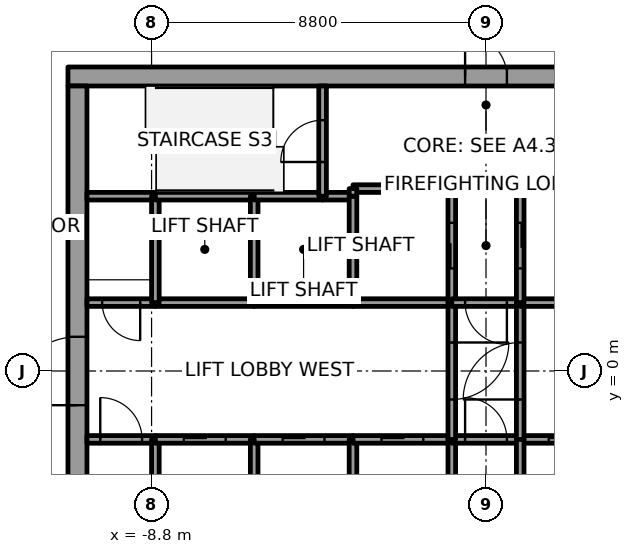
"""IFC4 building model, lengths in metres.
Left out: names, types, materials, properties, quantities, classifications, styles, units other than length and angle.
Written with IfcOpenShell. Run it as: python <this file> out.ifc"""

import sys

from ifc_helpers import new_model, si_unit, direction, frame, frame_2d, origin, place, context, subcontext, project, spatial, rectangle, extrude, element, fill, save


model = new_model("IFC4")
c1 = context("Model", 3, precision=1e-05, world=origin(), true_north=direction((0.0, 1.0)))
c2 = subcontext(c1, "Body", "Model", "MODEL_VIEW")
j1 = project(units=[si_unit("LENGTHUNIT", "METRE"), si_unit("PLANEANGLEUNIT", "RADIAN")], contexts=[c1])
p1 = place(None, origin())
s1 = spatial("IfcSite", under=j1, at=p1, CompositionType="ELEMENT")
p2 = place(p1, origin())
s2 = spatial("IfcBuilding", under=s1, at=p2, CompositionType="ELEMENT")
p3 = place(p2, frame((0.0, 0.0, 157.8)))
s3 = spatial("IfcBuildingStorey", under=s2, at=p3, CompositionType="ELEMENT", Elevation=157.8)
p4 = place(p3, frame((-11.0, 7.75, 0.0), z_axis=(0.0, 0.0, 1.0), x_axis=(1.0, 0.0, 0.0)))
e1 = element("IfcWall", 1, at=p4, inside=s3, PredefinedType="SHEAR", context=c2, shape_type="SweptSolid", body=[
    extrude(rectangle(XDim=22.0, YDim=0.5, at=frame_2d((11.0, 0.0))), origin(), (0.0, 0.0, 1.0), 4.0),
])
p5 = place(p4, frame((10.45, 0.0, 0.0)))
e2 = element("IfcOpeningElement", 2, at=p5, cuts=e1, PredefinedType="OPENING", context=c2, shape_type="SweptSolid", body=[
    extrude(rectangle(XDim=1.1, YDim=2.1, at=frame_2d((0.55, 1.05))), frame((0.0, 0.25, 0.0), z_axis=(0.0, -1.0, 0.0), x_axis=(1.0, 0.0, 0.0)), (0.0, 0.0, 1.0), 0.5),
])
p6 = place(p3, frame((-10.75, -7.5, 0.0), z_axis=(0.0, 0.0, 1.0), x_axis=(0.0, 1.0, 0.0)))
e3 = element("IfcWall", 3, at=p6, inside=s3, PredefinedType="SHEAR", context=c2, shape_type="SweptSolid", body=[
    extrude(rectangle(XDim=15.0, YDim=0.5, at=frame_2d((7.5, 0.0))), origin(), (0.0, 0.0, 1.0), 4.0),
])
p7 = place(p6, frame((6.6, 0.0, 0.0)))
e4 = element("IfcOpeningElement", 4, at=p7, cuts=e3, PredefinedType="OPENING", context=c2, shape_type="SweptSolid", body=[
    extrude(rectangle(XDim=1.8, YDim=2.1, at=frame_2d((0.9, 1.05))), frame((0.0, 0.25, 0.0), z_axis=(0.0, -1.0, 0.0), x_axis=(1.0, 0.0, 0.0)), (0.0, 0.0, 1.0), 0.5),
])
p8 = place(p3, frame((-10.5, -1.8, 0.0), z_axis=(0.0, 0.0, 1.0), x_axis=(1.0, 0.0, 0.0)))
e5 = element("IfcWall", 5, at=p8, inside=s3, PredefinedType="SOLIDWALL", context=c2, shape_type="SweptSolid", body=[
    extrude(rectangle(XDim=1.8, YDim=0.2, at=frame_2d((0.9, 0.0))), origin(), (0.0, 0.0, 1.0), 3.85),
])
p9 = place(p8, frame((0.35, 0.0, 0.0)))
e6 = element("IfcOpeningElement", 6, at=p9, cuts=e5, PredefinedType="OPENING", context=c2, shape_type="SweptSolid", body=[
    extrude(rectangle(XDim=1.1, YDim=2.1, at=frame_2d((0.55, 1.05))), frame((0.0, 0.1, 0.0), z_axis=(0.0, -1.0, 0.0), x_axis=(1.0, 0.0, 0.0)), (0.0, 0.0, 1.0), 0.2),
])
p10 = place(p3, frame((-8.7, 1.8, 0.0), z_axis=(0.0, 0.0, 1.0), x_axis=(-1.0, 0.0, 0.0)))
e7 = element("IfcWall", 7, at=p10, inside=s3, PredefinedType="SOLIDWALL", context=c2, shape_type="SweptSolid", body=[
    extrude(rectangle(XDim=1.8, YDim=0.2, at=frame_2d((0.9, 0.0))), origin(), (0.0, 0.0, 1.0), 3.85),
])
p11 = place(p10, frame((0.4, 0.0, 0.0)))
e8 = element("IfcOpeningElement", 8, at=p11, cuts=e7, PredefinedType="OPENING", context=c2, shape_type="SweptSolid", body=[
    extrude(rectangle(XDim=1.0, YDim=2.1, at=frame_2d((0.5, 1.05))), frame((0.0, 0.1, 0.0), z_axis=(0.0, -1.0, 0.0), x_axis=(1.0, 0.0, 0.0)), (0.0, 0.0, 1.0), 0.2),
])
p12 = place(p3, frame((-8.7, 4.6, 0.0), z_axis=(0.0, 0.0, 1.0), x_axis=(-1.0, 0.0, 0.0)))
e9 = element("IfcWall", 9, at=p12, inside=s3, PredefinedType="SOLIDWALL", context=c2, shape_type="SweptSolid", body=[
    extrude(rectangle(XDim=1.8, YDim=0.2, at=frame_2d((0.9, 0.0))), origin(), (0.0, 0.0, 1.0), 3.85),
])
p13 = place(p3, frame((-8.7, -4.6, 0.0), z_axis=(0.0, 0.0, 1.0), x_axis=(0.0, 1.0, 0.0)))
e10 = element("IfcWall", 10, at=p13, inside=s3, PredefinedType="SOLIDWALL", context=c2, shape_type="SweptSolid", body=[
    extrude(rectangle(XDim=2.8, YDim=0.2, at=frame_2d((1.4, 0.0))), origin(), (0.0, 0.0, 1.0), 3.85),
])
p14 = place(p3, frame((-8.7, -1.8, 0.0), z_axis=(0.0, 0.0, 1.0), x_axis=(1.0, 0.0, 0.0)))
e11 = element("IfcWall", 11, at=p14, inside=s3, PredefinedType="SOLIDWALL", context=c2, shape_type="SweptSolid", body=[
    extrude(rectangle(XDim=2.6, YDim=0.2, at=frame_2d((1.3, 0.0))), origin(), (0.0, 0.0, 1.0), 3.85),
])
p15 = place(p14, frame((0.75, 0.0, 0.0)))
e12 = element("IfcOpeningElement", 12, at=p15, cuts=e11, PredefinedType="OPENING", context=c2, shape_type="SweptSolid", body=[
    extrude(rectangle(XDim=1.1, YDim=2.1, at=frame_2d((0.55, 1.05))), frame((0.0, 0.1, 0.0), z_axis=(0.0, -1.0, 0.0), x_axis=(1.0, 0.0, 0.0)), (0.0, 0.0, 1.0), 0.2),
])
p16 = place(p3, frame((-6.1, 1.8, 0.0), z_axis=(0.0, 0.0, 1.0), x_axis=(-1.0, 0.0, 0.0)))
e13 = element("IfcWall", 13, at=p16, inside=s3, PredefinedType="SOLIDWALL", context=c2, shape_type="SweptSolid", body=[
    extrude(rectangle(XDim=2.6, YDim=0.2, at=frame_2d((1.3, 0.0))), origin(), (0.0, 0.0, 1.0), 3.85),
])
p17 = place(p3, frame((-8.7, 1.8, 0.0), z_axis=(0.0, 0.0, 1.0), x_axis=(0.0, 1.0, 0.0)))
e14 = element("IfcWall", 14, at=p17, inside=s3, PredefinedType="SOLIDWALL", context=c2, shape_type="SweptSolid", body=[
    extrude(rectangle(XDim=2.8, YDim=0.2, at=frame_2d((1.4, 0.0))), origin(), (0.0, 0.0, 1.0), 3.85),
])
p18 = place(p3, frame((-6.1, 4.6, 0.0), z_axis=(0.0, 0.0, 1.0), x_axis=(-1.0, 0.0, 0.0)))
e15 = element("IfcWall", 15, at=p18, inside=s3, PredefinedType="SOLIDWALL", context=c2, shape_type="SweptSolid", body=[
    extrude(rectangle(XDim=2.6, YDim=0.2, at=frame_2d((1.3, 0.0))), origin(), (0.0, 0.0, 1.0), 3.85),
])
p19 = place(p3, frame((-6.1, -4.6, 0.0), z_axis=(0.0, 0.0, 1.0), x_axis=(0.0, 1.0, 0.0)))
e16 = element("IfcWall", 16, at=p19, inside=s3, PredefinedType="SOLIDWALL", context=c2, shape_type="SweptSolid", body=[
    extrude(rectangle(XDim=2.8, YDim=0.2, at=frame_2d((1.4, 0.0))), origin(), (0.0, 0.0, 1.0), 3.85),
])
p20 = place(p3, frame((-6.1, -1.8, 0.0), z_axis=(0.0, 0.0, 1.0), x_axis=(1.0, 0.0, 0.0)))
e17 = element("IfcWall", 17, at=p20, inside=s3, PredefinedType="SOLIDWALL", context=c2, shape_type="SweptSolid", body=[
    extrude(rectangle(XDim=2.6, YDim=0.2, at=frame_2d((1.3, 0.0))), origin(), (0.0, 0.0, 1.0), 3.85),
])
p21 = place(p20, frame((0.75, 0.0, 0.0)))
e18 = element("IfcOpeningElement", 18, at=p21, cuts=e17, PredefinedType="OPENING", context=c2, shape_type="SweptSolid", body=[
    extrude(rectangle(XDim=1.1, YDim=2.1, at=frame_2d((0.55, 1.05))), frame((0.0, 0.1, 0.0), z_axis=(0.0, -1.0, 0.0), x_axis=(1.0, 0.0, 0.0)), (0.0, 0.0, 1.0), 0.2),
])
p22 = place(p3, frame((-3.5, 1.8, 0.0), z_axis=(0.0, 0.0, 1.0), x_axis=(-1.0, 0.0, 0.0)))
e19 = element("IfcWall", 19, at=p22, inside=s3, PredefinedType="SOLIDWALL", context=c2, shape_type="SweptSolid", body=[
    extrude(rectangle(XDim=2.6, YDim=0.2, at=frame_2d((1.3, 0.0))), origin(), (0.0, 0.0, 1.0), 3.85),
])
p23 = place(p3, frame((-6.1, 1.8, 0.0), z_axis=(0.0, 0.0, 1.0), x_axis=(0.0, 1.0, 0.0)))
e20 = element("IfcWall", 20, at=p23, inside=s3, PredefinedType="SOLIDWALL", context=c2, shape_type="SweptSolid", body=[
    extrude(rectangle(XDim=2.8, YDim=0.2, at=frame_2d((1.4, 0.0))), origin(), (0.0, 0.0, 1.0), 3.85),
])
p24 = place(p3, frame((-4.3, 4.6, 0.0), z_axis=(0.0, 0.0, 1.0), x_axis=(-1.0, 0.0, 0.0)))
e21 = element("IfcWall", 21, at=p24, inside=s3, PredefinedType="SOLIDWALL", context=c2, shape_type="SweptSolid", body=[
    extrude(rectangle(XDim=1.8, YDim=0.2, at=frame_2d((0.9, 0.0))), origin(), (0.0, 0.0, 1.0), 3.85),
])
p25 = place(p3, frame((-3.5, 4.6, 0.0), z_axis=(0.0, 0.0, 1.0), x_axis=(-1.0, 0.0, 0.0)))
e22 = element("IfcWall", 22, at=p25, inside=s3, PredefinedType="SOLIDWALL", context=c2, shape_type="SweptSolid", body=[
    extrude(rectangle(XDim=0.8, YDim=0.2, at=frame_2d((0.4, 0.0))), origin(), (0.0, 0.0, 1.0), 3.85),
])
p26 = place(p3, frame((-4.3, 4.6, 0.0), z_axis=(0.0, 0.0, 1.0), x_axis=(0.0, 1.0, 0.0)))
e23 = element("IfcWall", 23, at=p26, inside=s3, PredefinedType="SOLIDWALL", context=c2, shape_type="SweptSolid", body=[
    extrude(rectangle(XDim=2.9, YDim=0.2, at=frame_2d((1.45, 0.0))), origin(), (0.0, 0.0, 1.0), 3.85),
])
p27 = place(p26, frame((0.9, 0.0, 0.0)))
e24 = element("IfcOpeningElement", 24, at=p27, cuts=e23, PredefinedType="OPENING", context=c2, shape_type="SweptSolid", body=[
    extrude(rectangle(XDim=1.1, YDim=2.1, at=frame_2d((0.55, 1.05))), frame((0.0, 0.1, 0.0), z_axis=(0.0, -1.0, 0.0), x_axis=(1.0, 0.0, 0.0)), (0.0, 0.0, 1.0), 0.2),
])
p28 = place(p3, frame((-3.5, -4.6, 0.0), z_axis=(0.0, 0.0, 1.0), x_axis=(0.0, 1.0, 0.0)))
e25 = element("IfcWall", 25, at=p28, inside=s3, PredefinedType="SOLIDWALL", context=c2, shape_type="SweptSolid", body=[
    extrude(rectangle(XDim=2.8, YDim=0.2, at=frame_2d((1.4, 0.0))), origin(), (0.0, 0.0, 1.0), 3.85),
])
p29 = place(p3, frame((-3.5, -1.8, 0.0), z_axis=(0.0, 0.0, 1.0), x_axis=(1.0, 0.0, 0.0)))
e26 = element("IfcWall", 26, at=p29, inside=s3, PredefinedType="SOLIDWALL", context=c2, shape_type="SweptSolid", body=[
    extrude(rectangle(XDim=2.6, YDim=0.2, at=frame_2d((1.3, 0.0))), origin(), (0.0, 0.0, 1.0), 3.85),
])
p30 = place(p29, frame((0.75, 0.0, 0.0)))
e27 = element("IfcOpeningElement", 27, at=p30, cuts=e26, PredefinedType="OPENING", context=c2, shape_type="SweptSolid", body=[
    extrude(rectangle(XDim=1.1, YDim=2.1, at=frame_2d((0.55, 1.05))), frame((0.0, 0.1, 0.0), z_axis=(0.0, -1.0, 0.0), x_axis=(1.0, 0.0, 0.0)), (0.0, 0.0, 1.0), 0.2),
])
p31 = place(p3, frame((-0.9, 1.8, 0.0), z_axis=(0.0, 0.0, 1.0), x_axis=(-1.0, 0.0, 0.0)))
e28 = element("IfcWall", 28, at=p31, inside=s3, PredefinedType="SOLIDWALL", context=c2, shape_type="SweptSolid", body=[
    extrude(rectangle(XDim=2.6, YDim=0.2, at=frame_2d((1.3, 0.0))), origin(), (0.0, 0.0, 1.0), 3.85),
])
p32 = place(p3, frame((-3.5, 4.6, 0.0), z_axis=(0.0, 0.0, 1.0), x_axis=(0.0, -1.0, 0.0)))
e29 = element("IfcWall", 29, at=p32, inside=s3, PredefinedType="SOLIDWALL", context=c2, shape_type="SweptSolid", body=[
    extrude(rectangle(XDim=2.8, YDim=0.2, at=frame_2d((1.4, 0.0))), origin(), (0.0, 0.0, 1.0), 3.85),
])
p33 = place(p3, frame((-0.9, 1.8, 0.0), z_axis=(0.0, 0.0, 1.0), x_axis=(0.0, 1.0, 0.0)))
e30 = element("IfcWall", 30, at=p33, inside=s3, PredefinedType="SOLIDWALL", context=c2, shape_type="SweptSolid", body=[
    extrude(rectangle(XDim=3.0, YDim=0.2, at=frame_2d((1.5, 0.0))), origin(), (0.0, 0.0, 1.0), 3.85),
])
p34 = place(p33, frame((0.9, 0.0, 0.0)))
e31 = element("IfcOpeningElement", 31, at=p34, cuts=e30, PredefinedType="OPENING", context=c2, shape_type="SweptSolid", body=[
    extrude(rectangle(XDim=1.2, YDim=2.1, at=frame_2d((0.6, 1.05))), frame((0.0, 0.1, 0.0), z_axis=(0.0, -1.0, 0.0), x_axis=(1.0, 0.0, 0.0)), (0.0, 0.0, 1.0), 0.2),
])
p35 = place(p3, frame((-0.9, 4.8, 0.0), z_axis=(0.0, 0.0, 1.0), x_axis=(-1.0, 0.0, 0.0)))
e32 = element("IfcWall", 32, at=p35, inside=s3, PredefinedType="SOLIDWALL", context=c2, shape_type="SweptSolid", body=[
    extrude(rectangle(XDim=2.6, YDim=0.2, at=frame_2d((1.3, 0.0))), origin(), (0.0, 0.0, 1.0), 3.85),
])
p36 = place(p3, frame((-3.5, 4.8, 0.0), z_axis=(0.0, 0.0, 1.0), x_axis=(0.0, -1.0, 0.0)))
e33 = element("IfcWall", 33, at=p36, inside=s3, PredefinedType="SOLIDWALL", context=c2, shape_type="SweptSolid", body=[
    extrude(rectangle(XDim=0.2, YDim=0.2, at=frame_2d((0.1, 0.0))), origin(), (0.0, 0.0, 1.0), 3.85),
])
p37 = place(p3, frame((-0.9, -4.6, 0.0), z_axis=(0.0, 0.0, 1.0), x_axis=(0.0, 1.0, 0.0)))
e34 = element("IfcWall", 34, at=p37, inside=s3, PredefinedType="SOLIDWALL", context=c2, shape_type="SweptSolid", body=[
    extrude(rectangle(XDim=2.8, YDim=0.2, at=frame_2d((1.4, 0.0))), origin(), (0.0, 0.0, 1.0), 3.85),
])
p38 = place(p3, frame((-0.9, -1.8, 0.0), z_axis=(0.0, 0.0, 1.0), x_axis=(1.0, 0.0, 0.0)))
e35 = element("IfcWall", 35, at=p38, inside=s3, PredefinedType="SOLIDWALL", context=c2, shape_type="SweptSolid", body=[
    extrude(rectangle(XDim=1.8, YDim=0.2, at=frame_2d((0.9, 0.0))), origin(), (0.0, 0.0, 1.0), 3.85),
])
p39 = place(p38, frame((0.35, 0.0, 0.0)))
e36 = element("IfcOpeningElement", 36, at=p39, cuts=e35, PredefinedType="OPENING", context=c2, shape_type="SweptSolid", body=[
    extrude(rectangle(XDim=1.1, YDim=2.1, at=frame_2d((0.55, 1.05))), frame((0.0, 0.1, 0.0), z_axis=(0.0, -1.0, 0.0), x_axis=(1.0, 0.0, 0.0)), (0.0, 0.0, 1.0), 0.2),
])
p40 = place(p3, frame((-0.9, 1.8, 0.0), z_axis=(0.0, 0.0, 1.0), x_axis=(0.0, -1.0, 0.0)))
e37 = element("IfcWall", 37, at=p40, inside=s3, PredefinedType="SOLIDWALL", context=c2, shape_type="SweptSolid", body=[
    extrude(rectangle(XDim=3.6, YDim=0.2, at=frame_2d((1.8, 0.0))), origin(), (0.0, 0.0, 1.0), 3.85),
])
p41 = place(p40, frame((1.05, 0.0, 0.0)))
e38 = element("IfcOpeningElement", 38, at=p41, cuts=e37, PredefinedType="OPENING", context=c2, shape_type="SweptSolid", body=[
    extrude(rectangle(XDim=1.5, YDim=2.1, at=frame_2d((0.75, 1.05))), frame((0.0, 0.1, 0.0), z_axis=(0.0, -1.0, 0.0), x_axis=(1.0, 0.0, 0.0)), (0.0, 0.0, 1.0), 0.2),
])
p42 = place(p3, frame((0.9, 1.8, 0.0), z_axis=(0.0, 0.0, 1.0), x_axis=(-1.0, 0.0, 0.0)))
e39 = element("IfcWall", 39, at=p42, inside=s3, PredefinedType="SOLIDWALL", context=c2, shape_type="SweptSolid", body=[
    extrude(rectangle(XDim=1.8, YDim=0.2, at=frame_2d((0.9, 0.0))), origin(), (0.0, 0.0, 1.0), 3.85),
])
p43 = place(p42, frame((0.35, 0.0, 0.0)))
e40 = element("IfcOpeningElement", 40, at=p43, cuts=e39, PredefinedType="OPENING", context=c2, shape_type="SweptSolid", body=[
    extrude(rectangle(XDim=1.1, YDim=2.1, at=frame_2d((0.55, 1.05))), frame((0.0, 0.1, 0.0), z_axis=(0.0, -1.0, 0.0), x_axis=(1.0, 0.0, 0.0)), (0.0, 0.0, 1.0), 0.2),
])
p44 = place(p3, frame((0.9, -1.8, 0.0), z_axis=(0.0, 0.0, 1.0), x_axis=(1.0, 0.0, 0.0)))
e41 = element("IfcWall", 41, at=p44, inside=s3, PredefinedType="SOLIDWALL", context=c2, shape_type="SweptSolid", body=[
    extrude(rectangle(XDim=2.6, YDim=0.2, at=frame_2d((1.3, 0.0))), origin(), (0.0, 0.0, 1.0), 3.85),
])
p45 = place(p44, frame((0.75, 0.0, 0.0)))
e42 = element("IfcOpeningElement", 42, at=p45, cuts=e41, PredefinedType="OPENING", context=c2, shape_type="SweptSolid", body=[
    extrude(rectangle(XDim=1.1, YDim=2.1, at=frame_2d((0.55, 1.05))), frame((0.0, 0.1, 0.0), z_axis=(0.0, -1.0, 0.0), x_axis=(1.0, 0.0, 0.0)), (0.0, 0.0, 1.0), 0.2),
])
p46 = place(p3, frame((0.9, -1.8, 0.0), z_axis=(0.0, 0.0, 1.0), x_axis=(0.0, 1.0, 0.0)))
e43 = element("IfcWall", 43, at=p46, inside=s3, PredefinedType="SOLIDWALL", context=c2, shape_type="SweptSolid", body=[
    extrude(rectangle(XDim=3.6, YDim=0.2, at=frame_2d((1.8, 0.0))), origin(), (0.0, 0.0, 1.0), 3.85),
])
p47 = place(p46, frame((1.05, 0.0, 0.0)))
e44 = element("IfcOpeningElement", 44, at=p47, cuts=e43, PredefinedType="OPENING", context=c2, shape_type="SweptSolid", body=[
    extrude(rectangle(XDim=1.5, YDim=2.1, at=frame_2d((0.75, 1.05))), frame((0.0, 0.1, 0.0), z_axis=(0.0, -1.0, 0.0), x_axis=(1.0, 0.0, 0.0)), (0.0, 0.0, 1.0), 0.2),
])
p48 = place(p3, frame((0.9, -1.8, 0.0), z_axis=(0.0, 0.0, 1.0), x_axis=(0.0, -1.0, 0.0)))
e45 = element("IfcWall", 45, at=p48, inside=s3, PredefinedType="SOLIDWALL", context=c2, shape_type="SweptSolid", body=[
    extrude(rectangle(XDim=2.8, YDim=0.2, at=frame_2d((1.4, 0.0))), origin(), (0.0, 0.0, 1.0), 3.85),
])
for number, where, z_axis, x_axis in (
    (46, (3.5, 1.8, 0.0), (0.0, 0.0, 1.0), (-1.0, 0.0, 0.0)),
    (47, (3.5, 4.8, 0.0), (0.0, 0.0, 1.0), (-1.0, 0.0, 0.0)),
):
    element("IfcWall", number, at=place(p3, frame(where, z_axis=z_axis, x_axis=x_axis)), inside=s3, PredefinedType="SOLIDWALL", context=c2, shape_type="SweptSolid", body=[
        extrude(rectangle(XDim=2.6, YDim=0.2, at=frame_2d((1.3, 0.0))), origin(), (0.0, 0.0, 1.0), 3.85),
    ])
p49 = place(p3, frame((0.9, 4.8, 0.0), z_axis=(0.0, 0.0, 1.0), x_axis=(0.0, -1.0, 0.0)))
e48 = element("IfcWall", 48, at=p49, inside=s3, PredefinedType="SOLIDWALL", context=c2, shape_type="SweptSolid", body=[
    extrude(rectangle(XDim=3.0, YDim=0.2, at=frame_2d((1.5, 0.0))), origin(), (0.0, 0.0, 1.0), 3.85),
])
p50 = place(p49, frame((0.9, 0.0, 0.0)))
e49 = element("IfcOpeningElement", 49, at=p50, cuts=e48, PredefinedType="OPENING", context=c2, shape_type="SweptSolid", body=[
    extrude(rectangle(XDim=1.2, YDim=2.1, at=frame_2d((0.6, 1.05))), frame((0.0, 0.1, 0.0), z_axis=(0.0, -1.0, 0.0), x_axis=(1.0, 0.0, 0.0)), (0.0, 0.0, 1.0), 0.2),
])
p51 = place(p15, origin())
e50 = element("IfcDoor", 50, at=p51, inside=s3, OperationType="SLIDING_TO_LEFT", PredefinedType="DOOR", context=c2, shape_type="SweptSolid", body=[
    extrude(rectangle(XDim=1.1, YDim=2.1, at=frame_2d((0.55, 1.05))), frame((0.0, 0.025, 0.0), z_axis=(0.0, -1.0, 0.0), x_axis=(1.0, 0.0, 0.0)), (0.0, 0.0, 1.0), 0.05),
])
fill(e12, e50)
p52 = place(p21, origin())
e51 = element("IfcDoor", 51, at=p52, inside=s3, OperationType="SLIDING_TO_LEFT", PredefinedType="DOOR", context=c2, shape_type="SweptSolid", body=[
    extrude(rectangle(XDim=1.1, YDim=2.1, at=frame_2d((0.55, 1.05))), frame((0.0, 0.025, 0.0), z_axis=(0.0, -1.0, 0.0), x_axis=(1.0, 0.0, 0.0)), (0.0, 0.0, 1.0), 0.05),
])
fill(e18, e51)
p53 = place(p30, origin())
e52 = element("IfcDoor", 52, at=p53, inside=s3, OperationType="SLIDING_TO_RIGHT", PredefinedType="DOOR", context=c2, shape_type="SweptSolid", body=[
    extrude(rectangle(XDim=1.1, YDim=2.1, at=frame_2d((0.55, 1.05))), frame((0.0, 0.025, 0.0), z_axis=(0.0, -1.0, 0.0), x_axis=(1.0, 0.0, 0.0)), (0.0, 0.0, 1.0), 0.05),
])
fill(e27, e52)
p54 = place(p45, origin())
e53 = element("IfcDoor", 53, at=p54, inside=s3, OperationType="SLIDING_TO_RIGHT", PredefinedType="DOOR", context=c2, shape_type="SweptSolid", body=[
    extrude(rectangle(XDim=1.1, YDim=2.1, at=frame_2d((0.55, 1.05))), frame((0.0, 0.025, 0.0), z_axis=(0.0, -1.0, 0.0), x_axis=(1.0, 0.0, 0.0)), (0.0, 0.0, 1.0), 0.05),
])
fill(e42, e53)
p55 = place(p34, origin())
e54 = element("IfcDoor", 54, at=p55, inside=s3, OperationType="SLIDING_TO_LEFT", PredefinedType="DOOR", context=c2, shape_type="SweptSolid", body=[
    extrude(rectangle(XDim=1.2, YDim=2.1, at=frame_2d((0.6, 1.05))), frame((0.0, 0.025, 0.0), z_axis=(0.0, -1.0, 0.0), x_axis=(1.0, 0.0, 0.0)), (0.0, 0.0, 1.0), 0.05),
])
fill(e31, e54)
p56 = place(p50, origin())
e55 = element("IfcDoor", 55, at=p56, inside=s3, OperationType="SLIDING_TO_RIGHT", PredefinedType="DOOR", context=c2, shape_type="SweptSolid", body=[
    extrude(rectangle(XDim=1.2, YDim=2.1, at=frame_2d((0.6, 1.05))), frame((0.0, 0.025, 0.0), z_axis=(0.0, -1.0, 0.0), x_axis=(1.0, 0.0, 0.0)), (0.0, 0.0, 1.0), 0.05),
])
fill(e49, e55)
p57 = place(p41, origin())
e56 = element("IfcDoor", 56, at=p57, inside=s3, OperationType="DOUBLE_DOOR_SINGLE_SWING", PredefinedType="DOOR", context=c2, shape_type="SweptSolid", body=[
    extrude(rectangle(XDim=1.5, YDim=2.1, at=frame_2d((0.75, 1.05))), frame((0.0, 0.025, 0.0), z_axis=(0.0, -1.0, 0.0), x_axis=(1.0, 0.0, 0.0)), (0.0, 0.0, 1.0), 0.05),
])
fill(e38, e56)
p58 = place(p47, origin())
e57 = element("IfcDoor", 57, at=p58, inside=s3, OperationType="DOUBLE_DOOR_SINGLE_SWING", PredefinedType="DOOR", context=c2, shape_type="SweptSolid", body=[
    extrude(rectangle(XDim=1.5, YDim=2.1, at=frame_2d((0.75, 1.05))), frame((0.0, 0.025, 0.0), z_axis=(0.0, -1.0, 0.0), x_axis=(1.0, 0.0, 0.0)), (0.0, 0.0, 1.0), 0.05),
])
fill(e44, e57)
p59 = place(p9, origin())
e58 = element("IfcDoor", 58, at=p59, inside=s3, OperationType="SINGLE_SWING_LEFT", PredefinedType="DOOR", context=c2, shape_type="SweptSolid", body=[
    extrude(rectangle(XDim=1.1, YDim=2.1, at=frame_2d((0.55, 1.05))), frame((0.0, 0.025, 0.0), z_axis=(0.0, -1.0, 0.0), x_axis=(1.0, 0.0, 0.0)), (0.0, 0.0, 1.0), 0.05),
])
fill(e6, e58)
p60 = place(p43, origin())
e59 = element("IfcDoor", 59, at=p60, inside=s3, OperationType="SINGLE_SWING_RIGHT", PredefinedType="DOOR", context=c2, shape_type="SweptSolid", body=[
    extrude(rectangle(XDim=1.1, YDim=2.1, at=frame_2d((0.55, 1.05))), frame((0.0, 0.025, 0.0), z_axis=(0.0, -1.0, 0.0), x_axis=(1.0, 0.0, 0.0)), (0.0, 0.0, 1.0), 0.05),
])
fill(e40, e59)
p61 = place(p39, origin())
e60 = element("IfcDoor", 60, at=p61, inside=s3, OperationType="SINGLE_SWING_RIGHT", PredefinedType="DOOR", context=c2, shape_type="SweptSolid", body=[
    extrude(rectangle(XDim=1.1, YDim=2.1, at=frame_2d((0.55, 1.05))), frame((0.0, 0.025, 0.0), z_axis=(0.0, -1.0, 0.0), x_axis=(1.0, 0.0, 0.0)), (0.0, 0.0, 1.0), 0.05),
])
fill(e36, e60)
p62 = place(p11, origin())
e61 = element("IfcDoor", 61, at=p62, inside=s3, OperationType="SINGLE_SWING_LEFT", PredefinedType="DOOR", context=c2, shape_type="SweptSolid", body=[
    extrude(rectangle(XDim=1.0, YDim=2.1, at=frame_2d((0.5, 1.05))), frame((0.0, 0.025, 0.0), z_axis=(0.0, -1.0, 0.0), x_axis=(1.0, 0.0, 0.0)), (0.0, 0.0, 1.0), 0.05),
])
fill(e8, e61)
p63 = place(p27, origin())
e62 = element("IfcDoor", 62, at=p63, inside=s3, OperationType="SINGLE_SWING_RIGHT", PredefinedType="DOOR", context=c2, shape_type="SweptSolid", body=[
    extrude(rectangle(XDim=1.1, YDim=2.1, at=frame_2d((0.55, 1.05))), frame((0.0, 0.025, 0.0), z_axis=(0.0, -1.0, 0.0), x_axis=(1.0, 0.0, 0.0)), (0.0, 0.0, 1.0), 0.05),
])
fill(e24, e62)
p64 = place(p7, origin())
e63 = element("IfcDoor", 63, at=p64, inside=s3, OperationType="DOUBLE_DOOR_SINGLE_SWING", PredefinedType="DOOR", context=c2, shape_type="SweptSolid", body=[
    extrude(rectangle(XDim=1.8, YDim=2.1, at=frame_2d((0.9, 1.05))), frame((0.0, 0.025, 0.0), z_axis=(0.0, -1.0, 0.0), x_axis=(1.0, 0.0, 0.0)), (0.0, 0.0, 1.0), 0.05),
])
fill(e4, e63)
p65 = place(p5, origin())
e64 = element("IfcDoor", 64, at=p65, inside=s3, OperationType="SINGLE_SWING_LEFT", PredefinedType="DOOR", context=c2, shape_type="SweptSolid", body=[
    extrude(rectangle(XDim=1.1, YDim=2.1, at=frame_2d((0.55, 1.05))), frame((0.0, 0.025, 0.0), z_axis=(0.0, -1.0, 0.0), x_axis=(1.0, 0.0, 0.0)), (0.0, 0.0, 1.0), 0.05),
])
fill(e2, e64)
save(model, sys.argv[1])
